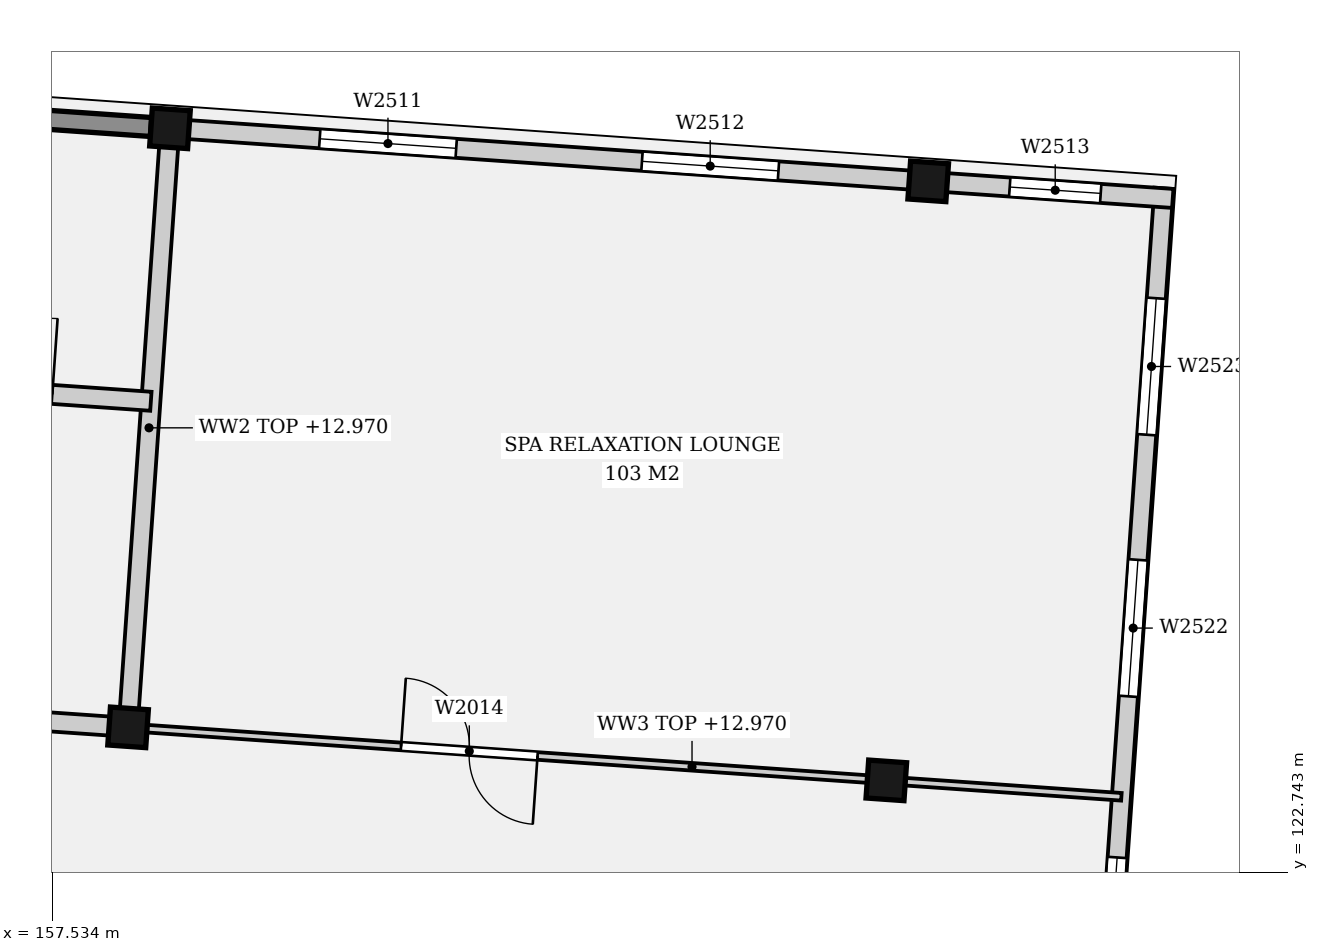
"""IFC4 building model, lengths in metres.
Left out: names, types, materials, properties, quantities, classifications, styles, units other than length and angle.
Written with IfcOpenShell. Run it as: python <this file> out.ifc"""

import sys

from ifc_helpers import new_model, si_unit, direction, frame, frame_2d, origin, origin_2d, place, context, subcontext, project, spatial, rectangle, extrude, element, fill, save


model = new_model("IFC4")
c1 = context("Model", 3, precision=1e-05, world=origin(), true_north=direction((0.0, 1.0)))
c2 = subcontext(c1, "Body", "Model", "MODEL_VIEW")
j1 = project(units=[si_unit("LENGTHUNIT", "METRE"), si_unit("PLANEANGLEUNIT", "RADIAN")], contexts=[c1])
p1 = place(None, origin())
s1 = spatial("IfcSite", under=j1, at=p1, CompositionType="ELEMENT")
p2 = place(p1, origin())
s2 = spatial("IfcBuilding", under=s1, at=p2, CompositionType="ELEMENT")
p3 = place(p2, frame((0.0, 0.0, 9.4)))
s3 = spatial("IfcBuildingStorey", under=s2, at=p3, CompositionType="ELEMENT", Elevation=9.4)
for number, where, z_axis, x_axis in (
    (1, (158.53, 124.65, 0.0), (0.0, 0.0, 1.0), (0.998, -0.07, 0.0)),
    (2, (159.081, 132.531, 0.0), (0.0, 0.0, 1.0), (0.998, -0.07, 0.0)),
    (3, (168.505, 123.952, 0.0), (0.0, 0.0, 1.0), (0.998, -0.07, 0.0)),
    (4, (169.056, 131.833, 0.0), (0.0, 0.0, 1.0), (0.998, -0.07, 0.0)),
):
    element("IfcColumn", number, at=place(p3, frame(where, z_axis=z_axis, x_axis=x_axis)), inside=s3, PredefinedType="COLUMN", context=c2, shape_type="SweptSolid", body=[
        extrude(rectangle(XDim=0.5, YDim=0.5, at=origin_2d()), origin(), (0.0, 0.0, 1.0), 4.4),
    ])
p4 = place(p3, frame((149.354, 133.211, 0.0), z_axis=(0.0, 0.0, 1.0), x_axis=(0.997562886035, -0.069773120941, 0.0)))
e5 = element("IfcWall", 5, at=p4, inside=s3, PredefinedType="SOLIDWALL", context=c2, shape_type="SweptSolid", body=[
    extrude(rectangle(XDim=9.5, YDim=0.25, at=frame_2d((4.75, 0.0))), origin(), (0.0, 0.0, 1.0), 3.57),
])
p5 = place(p3, frame((159.33, 132.513, 0.0), z_axis=(0.0, 0.0, 1.0), x_axis=(0.997562886035, -0.069773120941, 0.0)))
e6 = element("IfcWall", 6, at=p5, inside=s3, PredefinedType="SOLIDWALL", context=c2, shape_type="SweptSolid", body=[
    extrude(rectangle(XDim=9.5, YDim=0.25, at=frame_2d((4.75, 0.0))), origin(), (0.0, 0.0, 1.0), 3.57),
])
p6 = place(p5, frame((1.725, 0.0, 0.9)))
e7 = element("IfcOpeningElement", 7, at=p6, cuts=e6, PredefinedType="OPENING", context=c2, shape_type="SweptSolid", body=[
    extrude(rectangle(XDim=1.8, YDim=2.4, at=frame_2d((0.9, 1.2))), frame((0.0, 0.135, 0.0), z_axis=(0.0, -1.0, 0.0), x_axis=(1.0, 0.0, 0.0)), (0.0, 0.0, 1.0), 0.27),
])
p7 = place(p5, frame((5.975, 0.0, 0.9)))
e8 = element("IfcOpeningElement", 8, at=p7, cuts=e6, PredefinedType="OPENING", context=c2, shape_type="SweptSolid", body=[
    extrude(rectangle(XDim=1.8, YDim=2.4, at=frame_2d((0.9, 1.2))), frame((0.0, 0.135, 0.0), z_axis=(0.0, -1.0, 0.0), x_axis=(1.0, 0.0, 0.0)), (0.0, 0.0, 1.0), 0.27),
])
p8 = place(p3, frame((169.306, 131.815, 0.0), z_axis=(0.0, 0.0, 1.0), x_axis=(0.997563824095, -0.069759707979, 0.0)))
e9 = element("IfcWall", 9, at=p8, inside=s3, PredefinedType="SOLIDWALL", context=c2, shape_type="SweptSolid", body=[
    extrude(rectangle(XDim=2.975, YDim=0.25, at=frame_2d((1.487, 0.0))), origin(), (0.0, 0.0, 1.0), 3.57),
])
p9 = place(p8, frame((0.825, 0.0, 0.1)))
e10 = element("IfcOpeningElement", 10, at=p9, cuts=e9, PredefinedType="OPENING", context=c2, shape_type="SweptSolid", body=[
    extrude(rectangle(XDim=1.2, YDim=2.5, at=frame_2d((0.6, 1.25))), frame((0.0, 0.135, 0.0), z_axis=(0.0, -1.0, 0.0), x_axis=(1.0, 0.0, 0.0)), (0.0, 0.0, 1.0), 0.27),
])
p10 = place(p3, frame((170.801, 112.339, 0.0), z_axis=(0.0, 0.0, 1.0), x_axis=(0.069765298421, 0.997563433139, 0.0)))
e11 = element("IfcWall", 11, at=p10, inside=s3, PredefinedType="SOLIDWALL", context=c2, shape_type="SweptSolid", body=[
    extrude(rectangle(XDim=19.45, YDim=0.25, at=frame_2d((9.725, 0.0))), origin(), (0.0, 0.0, 1.0), 4.12),
])
p11 = place(p10, frame((1.45, 0.0, 0.9)))
e12 = element("IfcOpeningElement", 12, at=p11, cuts=e11, PredefinedType="OPENING", context=c2, shape_type="SweptSolid", body=[
    extrude(rectangle(XDim=1.8, YDim=2.4, at=frame_2d((0.9, 1.2))), frame((0.0, 0.135, 0.0), z_axis=(0.0, -1.0, 0.0), x_axis=(1.0, 0.0, 0.0)), (0.0, 0.0, 1.0), 0.27),
])
p12 = place(p10, frame((4.9, 0.0, 0.9)))
e13 = element("IfcOpeningElement", 13, at=p12, cuts=e11, PredefinedType="OPENING", context=c2, shape_type="SweptSolid", body=[
    extrude(rectangle(XDim=1.8, YDim=2.4, at=frame_2d((0.9, 1.2))), frame((0.0, 0.135, 0.0), z_axis=(0.0, -1.0, 0.0), x_axis=(1.0, 0.0, 0.0)), (0.0, 0.0, 1.0), 0.27),
])
p13 = place(p10, frame((8.825, 0.0, 0.9)))
e14 = element("IfcOpeningElement", 14, at=p13, cuts=e11, PredefinedType="OPENING", context=c2, shape_type="SweptSolid", body=[
    extrude(rectangle(XDim=1.8, YDim=2.4, at=frame_2d((0.9, 1.2))), frame((0.0, 0.135, 0.0), z_axis=(0.0, -1.0, 0.0), x_axis=(1.0, 0.0, 0.0)), (0.0, 0.0, 1.0), 0.27),
])
p14 = place(p10, frame((12.75, 0.0, 0.9)))
e15 = element("IfcOpeningElement", 15, at=p14, cuts=e11, PredefinedType="OPENING", context=c2, shape_type="SweptSolid", body=[
    extrude(rectangle(XDim=1.8, YDim=2.4, at=frame_2d((0.9, 1.2))), frame((0.0, 0.135, 0.0), z_axis=(0.0, -1.0, 0.0), x_axis=(1.0, 0.0, 0.0)), (0.0, 0.0, 1.0), 0.27),
])
p15 = place(p10, frame((16.2, 0.0, 0.9)))
e16 = element("IfcOpeningElement", 16, at=p15, cuts=e11, PredefinedType="OPENING", context=c2, shape_type="SweptSolid", body=[
    extrude(rectangle(XDim=1.8, YDim=2.4, at=frame_2d((0.9, 1.2))), frame((0.0, 0.135, 0.0), z_axis=(0.0, -1.0, 0.0), x_axis=(1.0, 0.0, 0.0)), (0.0, 0.0, 1.0), 0.27),
])
p16 = place(p3, frame((158.53, 124.65, 0.0), z_axis=(0.0, 0.0, 1.0), x_axis=(0.0697491702, 0.997564560947, 0.0)))
e17 = element("IfcWall", 17, at=p16, inside=s3, PredefinedType="SOLIDWALL", context=c2, shape_type="SweptSolid", body=[
    extrude(rectangle(XDim=7.9, YDim=0.25, at=frame_2d((3.95, 0.0))), origin(), (0.0, 0.0, 1.0), 3.57),
])
p17 = place(p3, frame((152.544, 125.068, 0.0), z_axis=(0.0, 0.0, 1.0), x_axis=(0.997562338811, -0.069780944286, 0.0)))
e18 = element("IfcWall", 18, at=p17, inside=s3, PredefinedType="SOLIDWALL", context=c2, shape_type="SweptSolid", body=[
    extrude(rectangle(XDim=6.0, YDim=0.25, at=frame_2d((3.0, 0.0))), origin(), (0.0, 0.0, 1.0), 3.57),
])
p18 = place(p17, frame((2.7, 0.0, 0.0)))
e19 = element("IfcOpeningElement", 19, at=p18, cuts=e18, PredefinedType="OPENING", context=c2, shape_type="SweptSolid", body=[
    extrude(rectangle(XDim=1.0, YDim=2.1, at=frame_2d((0.5, 1.05))), frame((0.0, 0.135, 0.0), z_axis=(0.0, -1.0, 0.0), x_axis=(1.0, 0.0, 0.0)), (0.0, 0.0, 1.0), 0.27),
])
p19 = place(p3, frame((158.53, 124.65, 0.0), z_axis=(0.0, 0.0, 1.0), x_axis=(0.997564014548, -0.069756984446, 0.0)))
e20 = element("IfcWall", 20, at=p19, inside=s3, PredefinedType="PARTITIONING", context=c2, shape_type="SweptSolid", body=[
    extrude(rectangle(XDim=13.1, YDim=0.1, at=frame_2d((6.55, 0.0))), origin(), (0.0, 0.0, 1.0), 3.57),
])
p20 = place(p19, frame((3.6, 0.0, 0.0)))
e21 = element("IfcOpeningElement", 21, at=p20, cuts=e20, PredefinedType="OPENING", context=c2, shape_type="SweptSolid", body=[
    extrude(rectangle(XDim=1.8, YDim=2.1, at=frame_2d((0.9, 1.05))), frame((0.0, 0.06, 0.0), z_axis=(0.0, -1.0, 0.0), x_axis=(1.0, 0.0, 0.0)), (0.0, 0.0, 1.0), 0.12),
])
p21 = place(p3, frame((152.844, 129.358, 0.0), z_axis=(0.0, 0.0, 1.0), x_axis=(0.997562140671, -0.069783776768, 0.0)))
e22 = element("IfcWall", 22, at=p21, inside=s3, PredefinedType="SOLIDWALL", context=c2, shape_type="SweptSolid", body=[
    extrude(rectangle(XDim=6.0, YDim=0.25, at=frame_2d((3.0, 0.0))), origin(), (0.0, 0.0, 1.0), 3.57),
])
p22 = place(p21, frame((3.7, 0.0, 0.0)))
e23 = element("IfcOpeningElement", 23, at=p22, cuts=e22, PredefinedType="OPENING", context=c2, shape_type="SweptSolid", body=[
    extrude(rectangle(XDim=1.0, YDim=2.1, at=frame_2d((0.5, 1.05))), frame((0.0, 0.135, 0.0), z_axis=(0.0, -1.0, 0.0), x_axis=(1.0, 0.0, 0.0)), (0.0, 0.0, 1.0), 0.27),
])
p23 = place(p21, frame((0.65, 0.0, 0.0)))
e24 = element("IfcOpeningElement", 24, at=p23, cuts=e22, PredefinedType="OPENING", context=c2, shape_type="SweptSolid", body=[
    extrude(rectangle(XDim=1.1, YDim=2.1, at=frame_2d((0.55, 1.05))), frame((0.0, 0.135, 0.0), z_axis=(0.0, -1.0, 0.0), x_axis=(1.0, 0.0, 0.0)), (0.0, 0.0, 1.0), 0.27),
])
p24 = place(p6, origin())
e25 = element("IfcWindow", 25, at=p24, inside=s3, PartitioningType="SINGLE_PANEL", PredefinedType="WINDOW", context=c2, shape_type="SweptSolid", body=[
    extrude(rectangle(XDim=1.8, YDim=2.4, at=frame_2d((0.9, 1.2))), frame((0.0, 0.03, 0.0), z_axis=(0.0, -1.0, 0.0), x_axis=(1.0, 0.0, 0.0)), (0.0, 0.0, 1.0), 0.06),
])
fill(e7, e25)
p25 = place(p7, origin())
e26 = element("IfcWindow", 26, at=p25, inside=s3, PartitioningType="SINGLE_PANEL", PredefinedType="WINDOW", context=c2, shape_type="SweptSolid", body=[
    extrude(rectangle(XDim=1.8, YDim=2.4, at=frame_2d((0.9, 1.2))), frame((0.0, 0.03, 0.0), z_axis=(0.0, -1.0, 0.0), x_axis=(1.0, 0.0, 0.0)), (0.0, 0.0, 1.0), 0.06),
])
fill(e8, e26)
p26 = place(p9, origin())
e27 = element("IfcWindow", 27, at=p26, inside=s3, PartitioningType="SINGLE_PANEL", PredefinedType="WINDOW", context=c2, shape_type="SweptSolid", body=[
    extrude(rectangle(XDim=1.2, YDim=2.5, at=frame_2d((0.6, 1.25))), frame((0.0, 0.03, 0.0), z_axis=(0.0, -1.0, 0.0), x_axis=(1.0, 0.0, 0.0)), (0.0, 0.0, 1.0), 0.06),
])
fill(e10, e27)
p27 = place(p13, origin())
e28 = element("IfcWindow", 28, at=p27, inside=s3, PartitioningType="SINGLE_PANEL", PredefinedType="WINDOW", context=c2, shape_type="SweptSolid", body=[
    extrude(rectangle(XDim=1.8, YDim=2.4, at=frame_2d((0.9, 1.2))), frame((0.0, 0.03, 0.0), z_axis=(0.0, -1.0, 0.0), x_axis=(1.0, 0.0, 0.0)), (0.0, 0.0, 1.0), 0.06),
])
fill(e14, e28)
p28 = place(p14, origin())
e29 = element("IfcWindow", 29, at=p28, inside=s3, PartitioningType="SINGLE_PANEL", PredefinedType="WINDOW", context=c2, shape_type="SweptSolid", body=[
    extrude(rectangle(XDim=1.8, YDim=2.4, at=frame_2d((0.9, 1.2))), frame((0.0, 0.03, 0.0), z_axis=(0.0, -1.0, 0.0), x_axis=(1.0, 0.0, 0.0)), (0.0, 0.0, 1.0), 0.06),
])
fill(e15, e29)
p29 = place(p15, origin())
e30 = element("IfcWindow", 30, at=p29, inside=s3, PartitioningType="SINGLE_PANEL", PredefinedType="WINDOW", context=c2, shape_type="SweptSolid", body=[
    extrude(rectangle(XDim=1.8, YDim=2.4, at=frame_2d((0.9, 1.2))), frame((0.0, 0.03, 0.0), z_axis=(0.0, -1.0, 0.0), x_axis=(1.0, 0.0, 0.0)), (0.0, 0.0, 1.0), 0.06),
])
fill(e16, e30)
p30 = place(p20, origin())
e31 = element("IfcDoor", 31, at=p30, inside=s3, OperationType="DOUBLE_DOOR_SINGLE_SWING", PredefinedType="DOOR", context=c2, shape_type="SweptSolid", body=[
    extrude(rectangle(XDim=1.8, YDim=2.1, at=frame_2d((0.9, 1.05))), frame((0.0, 0.025, 0.0), z_axis=(0.0, -1.0, 0.0), x_axis=(1.0, 0.0, 0.0)), (0.0, 0.0, 1.0), 0.05),
])
fill(e21, e31)
p31 = place(p22, origin())
e32 = element("IfcDoor", 32, at=p31, inside=s3, OperationType="SINGLE_SWING_RIGHT", PredefinedType="DOOR", context=c2, shape_type="SweptSolid", body=[
    extrude(rectangle(XDim=1.0, YDim=2.1, at=frame_2d((0.5, 1.05))), frame((0.0, 0.025, 0.0), z_axis=(0.0, -1.0, 0.0), x_axis=(1.0, 0.0, 0.0)), (0.0, 0.0, 1.0), 0.05),
])
fill(e23, e32)
save(model, sys.argv[1])
